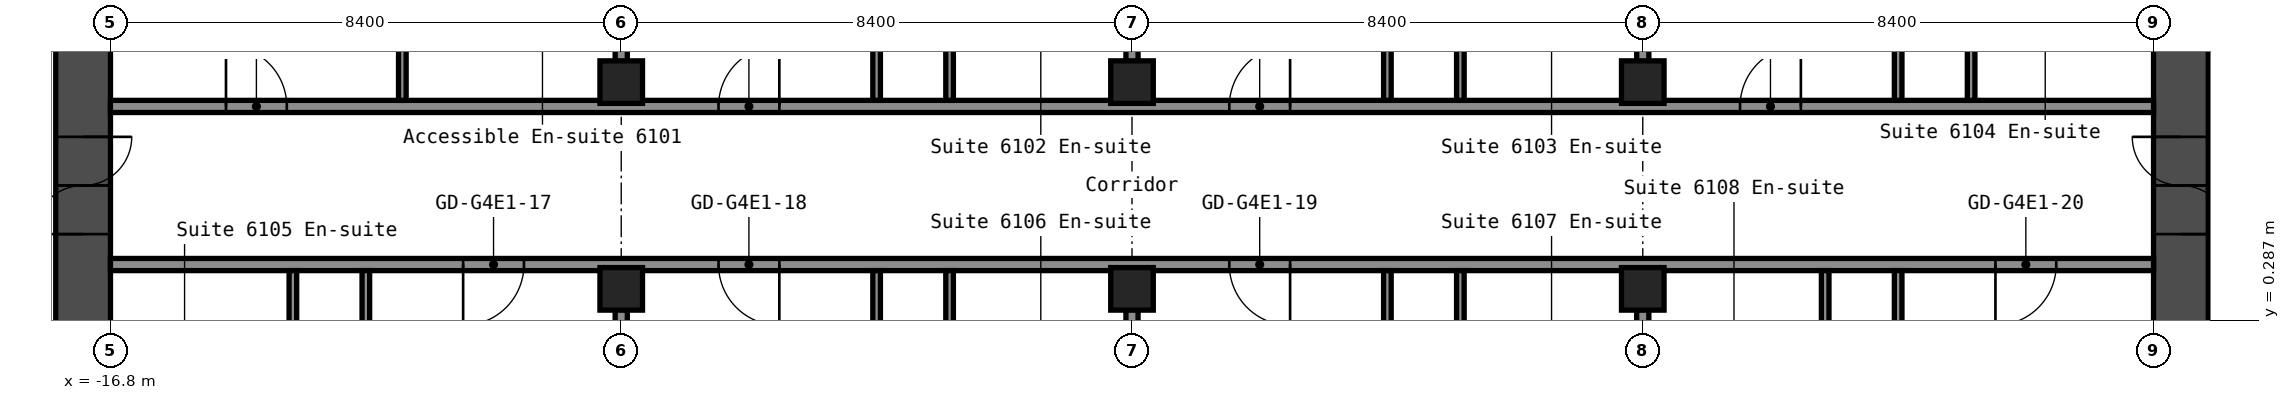
"""IFC4 building model, lengths in metres.
Left out: names, types, materials, properties, quantities, classifications, styles, units other than length and angle.
Written with IfcOpenShell. Run it as: python <this file> out.ifc"""

import sys

from ifc_helpers import new_model, si_unit, direction, frame, frame_2d, origin, origin_2d, place, context, subcontext, project, spatial, rectangle, hollow_rectangle, extrude, element, fill, save


model = new_model("IFC4")
c1 = context("Model", 3, precision=1e-05, world=origin(), true_north=direction((0.0, 1.0)))
c2 = subcontext(c1, "Body", "Model", "MODEL_VIEW")
j1 = project(units=[si_unit("LENGTHUNIT", "METRE"), si_unit("PLANEANGLEUNIT", "RADIAN")], contexts=[c1])
p1 = place(None, origin())
s1 = spatial("IfcSite", under=j1, at=p1, CompositionType="ELEMENT")
p2 = place(p1, origin())
s2 = spatial("IfcBuilding", under=s1, at=p2, CompositionType="ELEMENT")
p3 = place(p2, frame((0.0, 0.0, 215.4)))
s3 = spatial("IfcBuildingStorey", under=s2, at=p3, CompositionType="ELEMENT", Elevation=215.4)
for number, where, z_axis, x_axis in (
    (1, (-8.4, 0.8, 0.0), (0.0, 0.0, 1.0), (1.0, 0.0, 0.0)),
    (2, (-8.4, 4.2, 0.0), (0.0, 0.0, 1.0), (1.0, 0.0, 0.0)),
    (3, (0.0, 0.8, 0.0), (0.0, 0.0, 1.0), (1.0, 0.0, 0.0)),
    (4, (0.0, 4.2, 0.0), (0.0, 0.0, 1.0), (1.0, 0.0, 0.0)),
    (5, (8.4, 0.8, 0.0), (0.0, 0.0, 1.0), (1.0, 0.0, 0.0)),
    (6, (8.4, 4.2, 0.0), (0.0, 0.0, 1.0), (1.0, 0.0, 0.0)),
):
    element("IfcColumn", number, at=place(p3, frame(where, z_axis=z_axis, x_axis=x_axis)), inside=s3, PredefinedType="COLUMN", context=c2, shape_type="SweptSolid", body=[
        extrude(hollow_rectangle(XDim=0.7, YDim=0.7, WallThickness=0.028, at=origin_2d()), origin(), (0.0, 0.0, 1.0), 2.75),
    ])
p4 = place(p3, frame((-17.25, -8.4, 0.0), z_axis=(0.0, 0.0, 1.0), x_axis=(0.0, 1.0, 0.0)))
e7 = element("IfcWall", 7, at=p4, inside=s3, PredefinedType="SHEAR", context=c2, shape_type="SweptSolid", body=[
    extrude(rectangle(XDim=16.8, YDim=0.9, at=frame_2d((8.4, 0.0))), origin(), (0.0, 0.0, 1.0), 2.75),
])
p5 = place(p4, frame((10.1, 0.0, 0.0)))
e8 = element("IfcOpeningElement", 8, at=p5, cuts=e7, PredefinedType="OPENING", context=c2, shape_type="SweptSolid", body=[
    extrude(rectangle(XDim=1.6, YDim=2.1, at=frame_2d((0.8, 1.05))), frame((0.0, 0.46, 0.0), z_axis=(0.0, -1.0, 0.0), x_axis=(1.0, 0.0, 0.0)), (0.0, 0.0, 1.0), 0.92),
])
p6 = place(p3, frame((17.25, -8.4, 0.0), z_axis=(0.0, 0.0, 1.0), x_axis=(0.0, 1.0, 0.0)))
e9 = element("IfcWall", 9, at=p6, inside=s3, PredefinedType="SHEAR", context=c2, shape_type="SweptSolid", body=[
    extrude(rectangle(XDim=16.8, YDim=0.9, at=frame_2d((8.4, 0.0))), origin(), (0.0, 0.0, 1.0), 2.75),
])
p7 = place(p6, frame((10.1, 0.0, 0.0)))
e10 = element("IfcOpeningElement", 10, at=p7, cuts=e9, PredefinedType="OPENING", context=c2, shape_type="SweptSolid", body=[
    extrude(rectangle(XDim=1.6, YDim=2.1, at=frame_2d((0.8, 1.05))), frame((0.0, 0.46, 0.0), z_axis=(0.0, -1.0, 0.0), x_axis=(1.0, 0.0, 0.0)), (0.0, 0.0, 1.0), 0.92),
])
p8 = place(p3, frame((-16.8, 1.2, 0.0), z_axis=(0.0, 0.0, 1.0), x_axis=(1.0, 0.0, 0.0)))
e11 = element("IfcWall", 11, at=p8, inside=s3, PredefinedType="PARTITIONING", context=c2, shape_type="SweptSolid", body=[
    extrude(rectangle(XDim=33.6, YDim=0.2, at=frame_2d((16.8, 0.0))), origin(), (0.0, 0.0, 1.0), 2.75),
])
p9 = place(p8, frame((5.8, 0.0, 0.0)))
e12 = element("IfcOpeningElement", 12, at=p9, cuts=e11, PredefinedType="OPENING", context=c2, shape_type="SweptSolid", body=[
    extrude(rectangle(XDim=1.0, YDim=2.1, at=frame_2d((0.5, 1.05))), frame((0.0, 0.11, 0.0), z_axis=(0.0, -1.0, 0.0), x_axis=(1.0, 0.0, 0.0)), (0.0, 0.0, 1.0), 0.22),
])
p10 = place(p8, frame((10.0, 0.0, 0.0)))
e13 = element("IfcOpeningElement", 13, at=p10, cuts=e11, PredefinedType="OPENING", context=c2, shape_type="SweptSolid", body=[
    extrude(rectangle(XDim=1.0, YDim=2.1, at=frame_2d((0.5, 1.05))), frame((0.0, 0.11, 0.0), z_axis=(0.0, -1.0, 0.0), x_axis=(1.0, 0.0, 0.0)), (0.0, 0.0, 1.0), 0.22),
])
p11 = place(p8, frame((18.4, 0.0, 0.0)))
e14 = element("IfcOpeningElement", 14, at=p11, cuts=e11, PredefinedType="OPENING", context=c2, shape_type="SweptSolid", body=[
    extrude(rectangle(XDim=1.0, YDim=2.1, at=frame_2d((0.5, 1.05))), frame((0.0, 0.11, 0.0), z_axis=(0.0, -1.0, 0.0), x_axis=(1.0, 0.0, 0.0)), (0.0, 0.0, 1.0), 0.22),
])
p12 = place(p8, frame((31.0, 0.0, 0.0)))
e15 = element("IfcOpeningElement", 15, at=p12, cuts=e11, PredefinedType="OPENING", context=c2, shape_type="SweptSolid", body=[
    extrude(rectangle(XDim=1.0, YDim=2.1, at=frame_2d((0.5, 1.05))), frame((0.0, 0.11, 0.0), z_axis=(0.0, -1.0, 0.0), x_axis=(1.0, 0.0, 0.0)), (0.0, 0.0, 1.0), 0.22),
])
p13 = place(p3, frame((-16.8, 3.8, 0.0), z_axis=(0.0, 0.0, 1.0), x_axis=(1.0, 0.0, 0.0)))
e16 = element("IfcWall", 16, at=p13, inside=s3, PredefinedType="PARTITIONING", context=c2, shape_type="SweptSolid", body=[
    extrude(rectangle(XDim=33.6, YDim=0.2, at=frame_2d((16.8, 0.0))), origin(), (0.0, 0.0, 1.0), 2.75),
])
p14 = place(p13, frame((1.9, 0.0, 0.0)))
e17 = element("IfcOpeningElement", 17, at=p14, cuts=e16, PredefinedType="OPENING", context=c2, shape_type="SweptSolid", body=[
    extrude(rectangle(XDim=1.0, YDim=2.1, at=frame_2d((0.5, 1.05))), frame((0.0, 0.11, 0.0), z_axis=(0.0, -1.0, 0.0), x_axis=(1.0, 0.0, 0.0)), (0.0, 0.0, 1.0), 0.22),
])
p15 = place(p13, frame((10.0, 0.0, 0.0)))
e18 = element("IfcOpeningElement", 18, at=p15, cuts=e16, PredefinedType="OPENING", context=c2, shape_type="SweptSolid", body=[
    extrude(rectangle(XDim=1.0, YDim=2.1, at=frame_2d((0.5, 1.05))), frame((0.0, 0.11, 0.0), z_axis=(0.0, -1.0, 0.0), x_axis=(1.0, 0.0, 0.0)), (0.0, 0.0, 1.0), 0.22),
])
p16 = place(p13, frame((18.4, 0.0, 0.0)))
e19 = element("IfcOpeningElement", 19, at=p16, cuts=e16, PredefinedType="OPENING", context=c2, shape_type="SweptSolid", body=[
    extrude(rectangle(XDim=1.0, YDim=2.1, at=frame_2d((0.5, 1.05))), frame((0.0, 0.11, 0.0), z_axis=(0.0, -1.0, 0.0), x_axis=(1.0, 0.0, 0.0)), (0.0, 0.0, 1.0), 0.22),
])
p17 = place(p13, frame((26.8, 0.0, 0.0)))
e20 = element("IfcOpeningElement", 20, at=p17, cuts=e16, PredefinedType="OPENING", context=c2, shape_type="SweptSolid", body=[
    extrude(rectangle(XDim=1.0, YDim=2.1, at=frame_2d((0.5, 1.05))), frame((0.0, 0.11, 0.0), z_axis=(0.0, -1.0, 0.0), x_axis=(1.0, 0.0, 0.0)), (0.0, 0.0, 1.0), 0.22),
])
p18 = place(p3, frame((-13.8, -2.0, 0.0), z_axis=(0.0, 0.0, 1.0), x_axis=(0.0, 1.0, 0.0)))
e21 = element("IfcWall", 21, at=p18, inside=s3, PredefinedType="PARTITIONING", context=c2, shape_type="SweptSolid", body=[
    extrude(rectangle(XDim=3.1, YDim=0.125, at=frame_2d((1.55, 0.0))), origin(), (0.0, 0.0, 1.0), 2.75),
])
p19 = place(p3, frame((-12.6, -15.55, 0.0), z_axis=(0.0, 0.0, 1.0), x_axis=(0.0, 1.0, 0.0)))
e22 = element("IfcWall", 22, at=p19, inside=s3, PredefinedType="PARTITIONING", context=c2, shape_type="SweptSolid", body=[
    extrude(rectangle(XDim=16.65, YDim=0.125, at=frame_2d((8.325, 0.0))), origin(), (0.0, 0.0, 1.0), 2.75),
])
p20 = place(p19, frame((11.7, 0.0, 0.0)))
e23 = element("IfcOpeningElement", 23, at=p20, cuts=e22, PredefinedType="OPENING", context=c2, shape_type="SweptSolid", body=[
    extrude(rectangle(XDim=0.9, YDim=2.1, at=frame_2d((0.45, 1.05))), frame((0.0, 0.073, 0.0), z_axis=(0.0, -1.0, 0.0), x_axis=(1.0, 0.0, 0.0)), (0.0, 0.0, 1.0), 0.145),
])
p21 = place(p3, frame((-12.0, 3.9, 0.0), z_axis=(0.0, 0.0, 1.0), x_axis=(0.0, 1.0, 0.0)))
e24 = element("IfcWall", 24, at=p21, inside=s3, PredefinedType="PARTITIONING", context=c2, shape_type="SweptSolid", body=[
    extrude(rectangle(XDim=3.3, YDim=0.125, at=frame_2d((1.65, 0.0))), origin(), (0.0, 0.0, 1.0), 2.75),
])
p22 = place(p21, frame((1.1, 0.0, 0.0)))
e25 = element("IfcOpeningElement", 25, at=p22, cuts=e24, PredefinedType="OPENING", context=c2, shape_type="SweptSolid", body=[
    extrude(rectangle(XDim=1.0, YDim=2.1, at=frame_2d((0.5, 1.05))), frame((0.0, 0.073, 0.0), z_axis=(0.0, -1.0, 0.0), x_axis=(1.0, 0.0, 0.0)), (0.0, 0.0, 1.0), 0.145),
])
for number, where, z_axis, x_axis in (
    (26, (-8.4, -15.55, 0.0), (0.0, 0.0, 1.0), (0.0, 1.0, 0.0)),
    (27, (-8.4, 4.54, 0.0), (0.0, 0.0, 1.0), (0.0, 1.0, 0.0)),
):
    element("IfcWall", number, at=place(p3, frame(where, z_axis=z_axis, x_axis=x_axis)), inside=s3, PredefinedType="PARTITIONING", context=c2, shape_type="SweptSolid", body=[
        extrude(rectangle(XDim=16.01, YDim=0.2, at=frame_2d((8.005, 0.0))), origin(), (0.0, 0.0, 1.0), 2.75),
    ])
p23 = place(p3, frame((-4.2, -15.55, 0.0), z_axis=(0.0, 0.0, 1.0), x_axis=(0.0, 1.0, 0.0)))
e28 = element("IfcWall", 28, at=p23, inside=s3, PredefinedType="PARTITIONING", context=c2, shape_type="SweptSolid", body=[
    extrude(rectangle(XDim=16.65, YDim=0.125, at=frame_2d((8.325, 0.0))), origin(), (0.0, 0.0, 1.0), 2.75),
])
p24 = place(p23, frame((11.7, 0.0, 0.0)))
e29 = element("IfcOpeningElement", 29, at=p24, cuts=e28, PredefinedType="OPENING", context=c2, shape_type="SweptSolid", body=[
    extrude(rectangle(XDim=0.9, YDim=2.1, at=frame_2d((0.45, 1.05))), frame((0.0, 0.073, 0.0), z_axis=(0.0, -1.0, 0.0), x_axis=(1.0, 0.0, 0.0)), (0.0, 0.0, 1.0), 0.145),
])
p25 = place(p3, frame((-4.2, 3.9, 0.0), z_axis=(0.0, 0.0, 1.0), x_axis=(0.0, 1.0, 0.0)))
e30 = element("IfcWall", 30, at=p25, inside=s3, PredefinedType="PARTITIONING", context=c2, shape_type="SweptSolid", body=[
    extrude(rectangle(XDim=16.65, YDim=0.125, at=frame_2d((8.325, 0.0))), origin(), (0.0, 0.0, 1.0), 2.75),
])
p26 = place(p25, frame((4.05, 0.0, 0.0)))
e31 = element("IfcOpeningElement", 31, at=p26, cuts=e30, PredefinedType="OPENING", context=c2, shape_type="SweptSolid", body=[
    extrude(rectangle(XDim=0.9, YDim=2.1, at=frame_2d((0.45, 1.05))), frame((0.0, 0.073, 0.0), z_axis=(0.0, -1.0, 0.0), x_axis=(1.0, 0.0, 0.0)), (0.0, 0.0, 1.0), 0.145),
])
for number, where, z_axis, x_axis in (
    (32, (-3.0, -2.0, 0.0), (0.0, 0.0, 1.0), (0.0, 1.0, 0.0)),
    (33, (-3.0, 3.9, 0.0), (0.0, 0.0, 1.0), (0.0, 1.0, 0.0)),
):
    element("IfcWall", number, at=place(p3, frame(where, z_axis=z_axis, x_axis=x_axis)), inside=s3, PredefinedType="PARTITIONING", context=c2, shape_type="SweptSolid", body=[
        extrude(rectangle(XDim=3.1, YDim=0.125, at=frame_2d((1.55, 0.0))), origin(), (0.0, 0.0, 1.0), 2.75),
    ])
for number, where, z_axis, x_axis in (
    (34, (0.0, -15.55, 0.0), (0.0, 0.0, 1.0), (0.0, 1.0, 0.0)),
    (35, (0.0, 4.54, 0.0), (0.0, 0.0, 1.0), (0.0, 1.0, 0.0)),
):
    element("IfcWall", number, at=place(p3, frame(where, z_axis=z_axis, x_axis=x_axis)), inside=s3, PredefinedType="PARTITIONING", context=c2, shape_type="SweptSolid", body=[
        extrude(rectangle(XDim=16.01, YDim=0.2, at=frame_2d((8.005, 0.0))), origin(), (0.0, 0.0, 1.0), 2.75),
    ])
p27 = place(p3, frame((4.2, -15.55, 0.0), z_axis=(0.0, 0.0, 1.0), x_axis=(0.0, 1.0, 0.0)))
e36 = element("IfcWall", 36, at=p27, inside=s3, PredefinedType="PARTITIONING", context=c2, shape_type="SweptSolid", body=[
    extrude(rectangle(XDim=16.65, YDim=0.125, at=frame_2d((8.325, 0.0))), origin(), (0.0, 0.0, 1.0), 2.75),
])
p28 = place(p27, frame((11.7, 0.0, 0.0)))
e37 = element("IfcOpeningElement", 37, at=p28, cuts=e36, PredefinedType="OPENING", context=c2, shape_type="SweptSolid", body=[
    extrude(rectangle(XDim=0.9, YDim=2.1, at=frame_2d((0.45, 1.05))), frame((0.0, 0.073, 0.0), z_axis=(0.0, -1.0, 0.0), x_axis=(1.0, 0.0, 0.0)), (0.0, 0.0, 1.0), 0.145),
])
p29 = place(p3, frame((4.2, 3.9, 0.0), z_axis=(0.0, 0.0, 1.0), x_axis=(0.0, 1.0, 0.0)))
e38 = element("IfcWall", 38, at=p29, inside=s3, PredefinedType="PARTITIONING", context=c2, shape_type="SweptSolid", body=[
    extrude(rectangle(XDim=16.65, YDim=0.125, at=frame_2d((8.325, 0.0))), origin(), (0.0, 0.0, 1.0), 2.75),
])
p30 = place(p29, frame((4.05, 0.0, 0.0)))
e39 = element("IfcOpeningElement", 39, at=p30, cuts=e38, PredefinedType="OPENING", context=c2, shape_type="SweptSolid", body=[
    extrude(rectangle(XDim=0.9, YDim=2.1, at=frame_2d((0.45, 1.05))), frame((0.0, 0.073, 0.0), z_axis=(0.0, -1.0, 0.0), x_axis=(1.0, 0.0, 0.0)), (0.0, 0.0, 1.0), 0.145),
])
for number, where, z_axis, x_axis in (
    (40, (5.4, -2.0, 0.0), (0.0, 0.0, 1.0), (0.0, 1.0, 0.0)),
    (41, (5.4, 3.9, 0.0), (0.0, 0.0, 1.0), (0.0, 1.0, 0.0)),
):
    element("IfcWall", number, at=place(p3, frame(where, z_axis=z_axis, x_axis=x_axis)), inside=s3, PredefinedType="PARTITIONING", context=c2, shape_type="SweptSolid", body=[
        extrude(rectangle(XDim=3.1, YDim=0.125, at=frame_2d((1.55, 0.0))), origin(), (0.0, 0.0, 1.0), 2.75),
    ])
for number, where, z_axis, x_axis in (
    (42, (8.4, -15.55, 0.0), (0.0, 0.0, 1.0), (0.0, 1.0, 0.0)),
    (43, (8.4, 4.54, 0.0), (0.0, 0.0, 1.0), (0.0, 1.0, 0.0)),
):
    element("IfcWall", number, at=place(p3, frame(where, z_axis=z_axis, x_axis=x_axis)), inside=s3, PredefinedType="PARTITIONING", context=c2, shape_type="SweptSolid", body=[
        extrude(rectangle(XDim=16.01, YDim=0.2, at=frame_2d((8.005, 0.0))), origin(), (0.0, 0.0, 1.0), 2.75),
    ])
p31 = place(p3, frame((11.4, -2.0, 0.0), z_axis=(0.0, 0.0, 1.0), x_axis=(0.0, 1.0, 0.0)))
e44 = element("IfcWall", 44, at=p31, inside=s3, PredefinedType="PARTITIONING", context=c2, shape_type="SweptSolid", body=[
    extrude(rectangle(XDim=3.1, YDim=0.125, at=frame_2d((1.55, 0.0))), origin(), (0.0, 0.0, 1.0), 2.75),
])
p32 = place(p3, frame((12.6, -15.55, 0.0), z_axis=(0.0, 0.0, 1.0), x_axis=(0.0, 1.0, 0.0)))
e45 = element("IfcWall", 45, at=p32, inside=s3, PredefinedType="PARTITIONING", context=c2, shape_type="SweptSolid", body=[
    extrude(rectangle(XDim=16.65, YDim=0.125, at=frame_2d((8.325, 0.0))), origin(), (0.0, 0.0, 1.0), 2.75),
])
p33 = place(p32, frame((11.7, 0.0, 0.0)))
e46 = element("IfcOpeningElement", 46, at=p33, cuts=e45, PredefinedType="OPENING", context=c2, shape_type="SweptSolid", body=[
    extrude(rectangle(XDim=0.9, YDim=2.1, at=frame_2d((0.45, 1.05))), frame((0.0, 0.073, 0.0), z_axis=(0.0, -1.0, 0.0), x_axis=(1.0, 0.0, 0.0)), (0.0, 0.0, 1.0), 0.145),
])
p34 = place(p3, frame((12.6, 3.9, 0.0), z_axis=(0.0, 0.0, 1.0), x_axis=(0.0, 1.0, 0.0)))
e47 = element("IfcWall", 47, at=p34, inside=s3, PredefinedType="PARTITIONING", context=c2, shape_type="SweptSolid", body=[
    extrude(rectangle(XDim=16.65, YDim=0.125, at=frame_2d((8.325, 0.0))), origin(), (0.0, 0.0, 1.0), 2.75),
])
p35 = place(p34, frame((4.05, 0.0, 0.0)))
e48 = element("IfcOpeningElement", 48, at=p35, cuts=e47, PredefinedType="OPENING", context=c2, shape_type="SweptSolid", body=[
    extrude(rectangle(XDim=0.9, YDim=2.1, at=frame_2d((0.45, 1.05))), frame((0.0, 0.073, 0.0), z_axis=(0.0, -1.0, 0.0), x_axis=(1.0, 0.0, 0.0)), (0.0, 0.0, 1.0), 0.145),
])
p36 = place(p3, frame((13.8, 3.9, 0.0), z_axis=(0.0, 0.0, 1.0), x_axis=(0.0, 1.0, 0.0)))
e49 = element("IfcWall", 49, at=p36, inside=s3, PredefinedType="PARTITIONING", context=c2, shape_type="SweptSolid", body=[
    extrude(rectangle(XDim=3.1, YDim=0.125, at=frame_2d((1.55, 0.0))), origin(), (0.0, 0.0, 1.0), 2.75),
])
p37 = place(p5, origin())
e50 = element("IfcDoor", 50, at=p37, inside=s3, OperationType="DOUBLE_DOOR_SINGLE_SWING", PredefinedType="DOOR", context=c2, shape_type="SweptSolid", body=[
    extrude(rectangle(XDim=1.6, YDim=2.1, at=frame_2d((0.8, 1.05))), frame((0.0, 0.025, 0.0), z_axis=(0.0, -1.0, 0.0), x_axis=(1.0, 0.0, 0.0)), (0.0, 0.0, 1.0), 0.05),
])
fill(e8, e50)
p38 = place(p7, origin())
e51 = element("IfcDoor", 51, at=p38, inside=s3, OperationType="DOUBLE_DOOR_SINGLE_SWING", PredefinedType="DOOR", context=c2, shape_type="SweptSolid", body=[
    extrude(rectangle(XDim=1.6, YDim=2.1, at=frame_2d((0.8, 1.05))), frame((0.0, 0.025, 0.0), z_axis=(0.0, -1.0, 0.0), x_axis=(1.0, 0.0, 0.0)), (0.0, 0.0, 1.0), 0.05),
])
fill(e10, e51)
p39 = place(p9, origin())
e52 = element("IfcDoor", 52, at=p39, inside=s3, OperationType="SINGLE_SWING_LEFT", PredefinedType="DOOR", context=c2, shape_type="SweptSolid", body=[
    extrude(rectangle(XDim=1.0, YDim=2.1, at=frame_2d((0.5, 1.05))), frame((0.0, 0.025, 0.0), z_axis=(0.0, -1.0, 0.0), x_axis=(1.0, 0.0, 0.0)), (0.0, 0.0, 1.0), 0.05),
])
fill(e12, e52)
p40 = place(p10, origin())
e53 = element("IfcDoor", 53, at=p40, inside=s3, OperationType="SINGLE_SWING_RIGHT", PredefinedType="DOOR", context=c2, shape_type="SweptSolid", body=[
    extrude(rectangle(XDim=1.0, YDim=2.1, at=frame_2d((0.5, 1.05))), frame((0.0, 0.025, 0.0), z_axis=(0.0, -1.0, 0.0), x_axis=(1.0, 0.0, 0.0)), (0.0, 0.0, 1.0), 0.05),
])
fill(e13, e53)
p41 = place(p11, origin())
e54 = element("IfcDoor", 54, at=p41, inside=s3, OperationType="SINGLE_SWING_RIGHT", PredefinedType="DOOR", context=c2, shape_type="SweptSolid", body=[
    extrude(rectangle(XDim=1.0, YDim=2.1, at=frame_2d((0.5, 1.05))), frame((0.0, 0.025, 0.0), z_axis=(0.0, -1.0, 0.0), x_axis=(1.0, 0.0, 0.0)), (0.0, 0.0, 1.0), 0.05),
])
fill(e14, e54)
p42 = place(p12, origin())
e55 = element("IfcDoor", 55, at=p42, inside=s3, OperationType="SINGLE_SWING_LEFT", PredefinedType="DOOR", context=c2, shape_type="SweptSolid", body=[
    extrude(rectangle(XDim=1.0, YDim=2.1, at=frame_2d((0.5, 1.05))), frame((0.0, 0.025, 0.0), z_axis=(0.0, -1.0, 0.0), x_axis=(1.0, 0.0, 0.0)), (0.0, 0.0, 1.0), 0.05),
])
fill(e15, e55)
p43 = place(p14, origin())
e56 = element("IfcDoor", 56, at=p43, inside=s3, OperationType="SINGLE_SWING_RIGHT", PredefinedType="DOOR", context=c2, shape_type="SweptSolid", body=[
    extrude(rectangle(XDim=1.0, YDim=2.1, at=frame_2d((0.5, 1.05))), frame((0.0, 0.025, 0.0), z_axis=(0.0, -1.0, 0.0), x_axis=(1.0, 0.0, 0.0)), (0.0, 0.0, 1.0), 0.05),
])
fill(e17, e56)
p44 = place(p15, origin())
e57 = element("IfcDoor", 57, at=p44, inside=s3, OperationType="SINGLE_SWING_LEFT", PredefinedType="DOOR", context=c2, shape_type="SweptSolid", body=[
    extrude(rectangle(XDim=1.0, YDim=2.1, at=frame_2d((0.5, 1.05))), frame((0.0, 0.025, 0.0), z_axis=(0.0, -1.0, 0.0), x_axis=(1.0, 0.0, 0.0)), (0.0, 0.0, 1.0), 0.05),
])
fill(e18, e57)
p45 = place(p16, origin())
e58 = element("IfcDoor", 58, at=p45, inside=s3, OperationType="SINGLE_SWING_LEFT", PredefinedType="DOOR", context=c2, shape_type="SweptSolid", body=[
    extrude(rectangle(XDim=1.0, YDim=2.1, at=frame_2d((0.5, 1.05))), frame((0.0, 0.025, 0.0), z_axis=(0.0, -1.0, 0.0), x_axis=(1.0, 0.0, 0.0)), (0.0, 0.0, 1.0), 0.05),
])
fill(e19, e58)
p46 = place(p17, origin())
e59 = element("IfcDoor", 59, at=p46, inside=s3, OperationType="SINGLE_SWING_LEFT", PredefinedType="DOOR", context=c2, shape_type="SweptSolid", body=[
    extrude(rectangle(XDim=1.0, YDim=2.1, at=frame_2d((0.5, 1.05))), frame((0.0, 0.025, 0.0), z_axis=(0.0, -1.0, 0.0), x_axis=(1.0, 0.0, 0.0)), (0.0, 0.0, 1.0), 0.05),
])
fill(e20, e59)
save(model, sys.argv[1])
